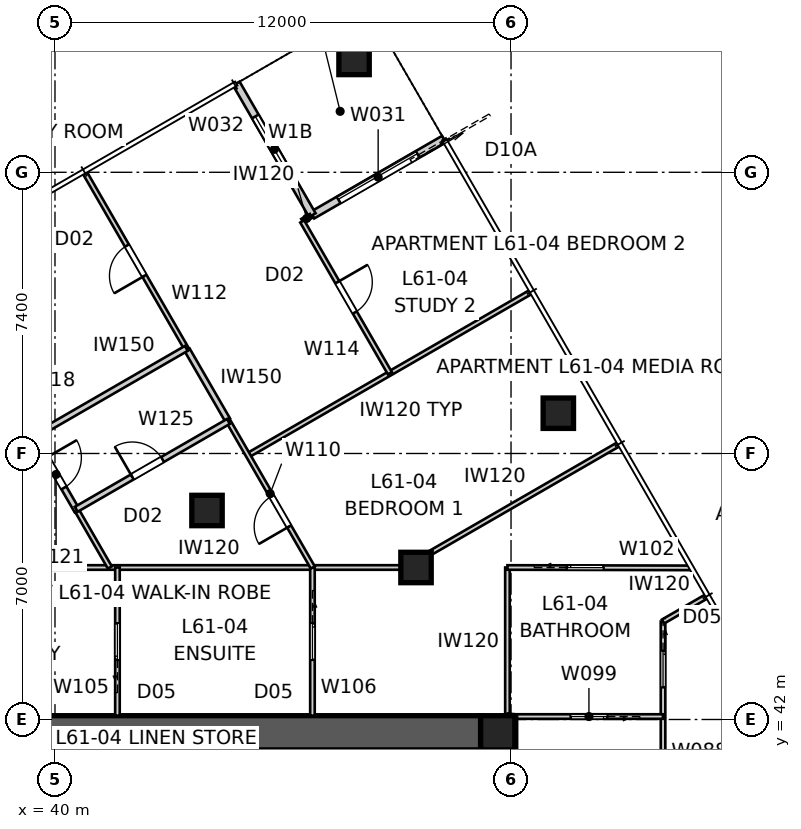
"""IFC4 building model, lengths in metres.
Left out: names, types, materials, properties, quantities, classifications, styles, units other than length and angle.
Written with IfcOpenShell. Run it as: python <this file> out.ifc"""

import sys

from ifc_helpers import new_model, si_unit, direction, frame, frame_2d, origin, origin_2d, place, context, subcontext, project, spatial, polyline, rectangle, outline, extrude, element, fill, save


model = new_model("IFC4")
c1 = context("Model", 3, precision=1e-05, world=origin(), true_north=direction((0.0, 1.0)))
c2 = subcontext(c1, "Body", "Model", "MODEL_VIEW")
j1 = project(units=[si_unit("LENGTHUNIT", "METRE"), si_unit("PLANEANGLEUNIT", "RADIAN")], contexts=[c1])
p1 = place(None, origin())
s1 = spatial("IfcSite", under=j1, at=p1, CompositionType="ELEMENT")
p2 = place(p1, origin())
s2 = spatial("IfcBuilding", under=s1, at=p2, CompositionType="ELEMENT")
p3 = place(p2, frame((0.0, 0.0, 221.8)))
s3 = spatial("IfcBuildingStorey", under=s2, at=p3, CompositionType="ELEMENT", Elevation=221.8)
p4 = place(p3, frame((28.8, 41.65, 0.0), z_axis=(0.0, 0.0, 1.0), x_axis=(1.0, 0.0, 0.0)))
e1 = element("IfcWall", 1, at=p4, inside=s3, PredefinedType="SHEAR", context=c2, shape_type="SweptSolid", body=[
    extrude(outline(polyline([(0.0, -0.45), (22.4, -0.45), (22.4, -0.025), (22.85, -0.025), (22.85, 0.025), (22.4, 0.025), (22.4, 0.45), (0.0, 0.45), (0.0, 0.025), (-0.45, 0.025), (-0.45, -0.025), (0.0, -0.025), (0.0, -0.45)])), origin(), (0.0, 0.0, 1.0), 3.4),
])
p5 = place(p3, frame((51.65, 18.8, 0.0), z_axis=(0.0, 0.0, 1.0), x_axis=(0.0, 1.0, 0.0)))
e2 = element("IfcWall", 2, at=p5, inside=s3, PredefinedType="SHEAR", context=c2, shape_type="SweptSolid", body=[
    extrude(outline(polyline([(0.0, -0.45), (22.4, -0.45), (22.4, -0.025), (22.85, -0.025), (22.85, 0.025), (22.4, 0.025), (22.4, 0.45), (0.0, 0.45), (0.0, 0.025), (-0.45, 0.025), (-0.45, -0.025), (0.0, -0.025), (0.0, -0.45)])), origin(), (0.0, 0.0, 1.0), 3.4),
])
p6 = place(p5, frame((11.14, 0.0, 0.0)))
e3 = element("IfcOpeningElement", 3, at=p6, cuts=e2, PredefinedType="OPENING", context=c2, shape_type="SweptSolid", body=[
    extrude(rectangle(XDim=1.02, YDim=2.4, at=frame_2d((0.51, 1.2))), frame((0.0, 0.46, 0.0), z_axis=(0.0, -1.0, 0.0), x_axis=(1.0, 0.0, 0.0)), (0.0, 0.0, 1.0), 0.92),
])
p7 = place(p3, frame((51.65, 41.65, 0.0), z_axis=(0.0, 0.0, 1.0), x_axis=(1.0, 0.0, 0.0)))
e4 = element("IfcColumn", 4, at=p7, inside=s3, PredefinedType="COLUMN", context=c2, shape_type="SweptSolid", body=[
    extrude(rectangle(XDim=0.9, YDim=0.9, at=origin_2d()), origin(), (0.0, 0.0, 1.0), 3.4),
])
for number, where, z_axis, x_axis in (
    (5, (53.245, 50.06, 0.0), (0.0, 0.0, 1.0), (1.0, 0.0, 0.0)),
    (6, (47.87, 59.37, 0.0), (0.0, 0.0, 1.0), (1.0, 0.0, 0.0)),
    (7, (49.5, 46.0, 0.0), (0.0, 0.0, 1.0), (1.0, 0.0, 0.0)),
    (8, (44.0, 47.5, 0.0), (0.0, 0.0, 1.0), (1.0, 0.0, 0.0)),
):
    element("IfcColumn", number, at=place(p3, frame(where, z_axis=z_axis, x_axis=x_axis)), inside=s3, PredefinedType="COLUMN", context=c2, shape_type="SweptSolid", body=[
        extrude(rectangle(XDim=0.8, YDim=0.8, at=origin_2d()), origin(), (0.0, 0.0, 1.0), 3.4),
    ])
p8 = place(p3, frame((50.236, 57.271, 0.0), z_axis=(0.0, 0.0, 1.0), x_axis=(-0.866026010844, -0.49999894854, 0.0)))
e9 = element("IfcWall", 9, at=p8, inside=s3, PredefinedType="SOLIDWALL", context=c2, shape_type="SweptSolid", body=[
    extrude(rectangle(XDim=4.0, YDim=0.2, at=frame_2d((2.0, 0.0))), origin(), (0.0, 0.0, 1.0), 3.25),
])
p9 = place(p8, frame((0.8, 0.0, 0.0)))
e10 = element("IfcOpeningElement", 10, at=p9, cuts=e9, PredefinedType="OPENING", context=c2, shape_type="SweptSolid", body=[
    extrude(rectangle(XDim=2.4, YDim=2.1, at=frame_2d((1.2, 1.05))), frame((0.0, 0.11, 0.0), z_axis=(0.0, -1.0, 0.0), x_axis=(1.0, 0.0, 0.0)), (0.0, 0.0, 1.0), 0.22),
])
p10 = place(p3, frame((46.771, 55.271, 0.0), z_axis=(0.0, 0.0, 1.0), x_axis=(-0.49999894854, 0.866026010844, 0.0)))
e11 = element("IfcWall", 11, at=p10, inside=s3, PredefinedType="SOLIDWALL", context=c2, shape_type="SweptSolid", body=[
    extrude(rectangle(XDim=4.0, YDim=0.2, at=frame_2d((2.0, 0.0))), origin(), (0.0, 0.0, 1.0), 3.25),
])
p11 = place(p10, frame((1.0, 0.0, 0.45)))
e12 = element("IfcOpeningElement", 12, at=p11, cuts=e11, PredefinedType="OPENING", context=c2, shape_type="SweptSolid", body=[
    extrude(rectangle(XDim=2.0, YDim=1.8, at=frame_2d((1.0, 0.9))), frame((0.0, 0.11, 0.0), z_axis=(0.0, -1.0, 0.0), x_axis=(1.0, 0.0, 0.0)), (0.0, 0.0, 1.0), 0.22),
])
p12 = place(p3, frame((59.486, 41.25, 0.0), z_axis=(0.0, 0.0, 1.0), x_axis=(-0.866020489494, -0.500008511703, 0.0)))
e13 = element("IfcWall", 13, at=p12, inside=s3, PredefinedType="PARTITIONING", context=c2, shape_type="SweptSolid", body=[
    extrude(rectangle(XDim=8.496, YDim=0.25, at=frame_2d((4.248, 0.0))), origin(), (0.0, 0.0, 1.0), 3.25),
])
p13 = place(p3, frame((56.0, 44.578, 0.0), z_axis=(0.0, 0.0, 1.0), x_axis=(0.0, -1.0, 0.0)))
e14 = element("IfcWall", 14, at=p13, inside=s3, PredefinedType="PARTITIONING", context=c2, shape_type="SweptSolid", body=[
    extrude(rectangle(XDim=10.681, YDim=0.12, at=frame_2d((5.34, 0.0))), origin(), (0.0, 0.0, 1.0), 2.55),
])
p14 = place(p13, frame((0.77, 0.0, 0.0)))
e15 = element("IfcOpeningElement", 15, at=p14, cuts=e14, PredefinedType="OPENING", context=c2, shape_type="SweptSolid", body=[
    extrude(rectangle(XDim=0.96, YDim=2.1, at=frame_2d((0.48, 1.05))), frame((0.0, 0.07, 0.0), z_axis=(0.0, -1.0, 0.0), x_axis=(1.0, 0.0, 0.0)), (0.0, 0.0, 1.0), 0.14),
])
p15 = place(p13, frame((7.379, 0.0, 0.0)))
e16 = element("IfcOpeningElement", 16, at=p15, cuts=e14, PredefinedType="OPENING", context=c2, shape_type="SweptSolid", body=[
    extrude(rectangle(XDim=0.96, YDim=2.1, at=frame_2d((0.48, 1.05))), frame((0.0, 0.07, 0.0), z_axis=(0.0, -1.0, 0.0), x_axis=(1.0, 0.0, 0.0)), (0.0, 0.0, 1.0), 0.14),
])
p16 = place(p3, frame((32.0, 46.0, 0.0), z_axis=(0.0, 0.0, 1.0), x_axis=(1.0, 0.0, 0.0)))
e17 = element("IfcWall", 17, at=p16, inside=s3, PredefinedType="PARTITIONING", context=c2, shape_type="SweptSolid", body=[
    extrude(rectangle(XDim=17.213, YDim=0.12, at=frame_2d((8.607, 0.0))), origin(), (0.0, 0.0, 1.0), 3.25),
])
p17 = place(p3, frame((56.0, 42.078, 0.0), z_axis=(0.0, 0.0, 1.0), x_axis=(-1.0, 0.0, 0.0)))
e18 = element("IfcWall", 18, at=p17, inside=s3, PredefinedType="PARTITIONING", context=c2, shape_type="SweptSolid", body=[
    extrude(rectangle(XDim=3.9, YDim=0.12, at=frame_2d((1.95, 0.0))), origin(), (0.0, 0.0, 1.0), 3.25),
])
p18 = place(p17, frame((1.47, 0.0, 0.0)))
e19 = element("IfcOpeningElement", 19, at=p18, cuts=e18, PredefinedType="OPENING", context=c2, shape_type="SweptSolid", body=[
    extrude(rectangle(XDim=0.96, YDim=2.1, at=frame_2d((0.48, 1.05))), frame((0.0, 0.07, 0.0), z_axis=(0.0, -1.0, 0.0), x_axis=(1.0, 0.0, 0.0)), (0.0, 0.0, 1.0), 0.14),
])
p19 = place(p3, frame((51.906, 42.1, 0.0), z_axis=(0.0, 0.0, 1.0), x_axis=(0.0, 1.0, 0.0)))
e20 = element("IfcWall", 20, at=p19, inside=s3, PredefinedType="PARTITIONING", context=c2, shape_type="SweptSolid", body=[
    extrude(rectangle(XDim=3.9, YDim=0.12, at=frame_2d((1.95, 0.0))), origin(), (0.0, 0.0, 1.0), 3.25),
])
p20 = place(p3, frame((51.906, 46.0, 0.0), z_axis=(0.0, 0.0, 1.0), x_axis=(0.999997822794, -0.002086721841, 0.0)))
e21 = element("IfcWall", 21, at=p20, inside=s3, PredefinedType="PARTITIONING", context=c2, shape_type="SweptSolid", body=[
    extrude(rectangle(XDim=4.797, YDim=0.12, at=frame_2d((2.398, 0.0))), origin(), (0.0, 0.0, 1.0), 3.25),
])
p21 = place(p20, frame((1.567, 0.0, 0.0)))
e22 = element("IfcOpeningElement", 22, at=p21, cuts=e21, PredefinedType="OPENING", context=c2, shape_type="SweptSolid", body=[
    extrude(rectangle(XDim=0.96, YDim=2.1, at=frame_2d((0.48, 1.05))), frame((0.0, 0.07, 0.0), z_axis=(0.0, -1.0, 0.0), x_axis=(1.0, 0.0, 0.0)), (0.0, 0.0, 1.0), 0.14),
])
p22 = place(p3, frame((57.138, 45.235, 0.0), z_axis=(0.0, 0.0, 1.0), x_axis=(-0.866040225545, -0.499974327079, 0.0)))
e23 = element("IfcWall", 23, at=p22, inside=s3, PredefinedType="PARTITIONING", context=c2, shape_type="SweptSolid", body=[
    extrude(rectangle(XDim=1.314, YDim=0.12, at=frame_2d((0.657, 0.0))), origin(), (0.0, 0.0, 1.0), 3.25),
])
p23 = place(p3, frame((52.1, 41.18, 0.0), z_axis=(0.0, 0.0, 1.0), x_axis=(0.0, 1.0, 0.0)))
e24 = element("IfcWall", 24, at=p23, inside=s3, PredefinedType="PARTITIONING", context=c2, shape_type="SweptSolid", body=[
    extrude(rectangle(XDim=0.898, YDim=0.12, at=frame_2d((0.449, 0.0))), origin(), (0.0, 0.0, 1.0), 3.25),
])
p24 = place(p3, frame((41.644, 42.1, 0.0), z_axis=(0.0, 0.0, 1.0), x_axis=(0.0, 1.0, 0.0)))
e25 = element("IfcWall", 25, at=p24, inside=s3, PredefinedType="PARTITIONING", context=c2, shape_type="SweptSolid", body=[
    extrude(rectangle(XDim=3.9, YDim=0.12, at=frame_2d((1.95, 0.0))), origin(), (0.0, 0.0, 1.0), 3.25),
])
p25 = place(p24, frame((1.47, 0.0, 0.0)))
e26 = element("IfcOpeningElement", 26, at=p25, cuts=e25, PredefinedType="OPENING", context=c2, shape_type="SweptSolid", body=[
    extrude(rectangle(XDim=0.96, YDim=2.1, at=frame_2d((0.48, 1.05))), frame((0.0, 0.07, 0.0), z_axis=(0.0, -1.0, 0.0), x_axis=(1.0, 0.0, 0.0)), (0.0, 0.0, 1.0), 0.14),
])
p26 = place(p3, frame((46.775, 46.0, 0.0), z_axis=(0.0, 0.0, 1.0), x_axis=(0.0, -1.0, 0.0)))
e27 = element("IfcWall", 27, at=p26, inside=s3, PredefinedType="PARTITIONING", context=c2, shape_type="SweptSolid", body=[
    extrude(rectangle(XDim=3.9, YDim=0.12, at=frame_2d((1.95, 0.0))), origin(), (0.0, 0.0, 1.0), 3.25),
])
p27 = place(p26, frame((1.47, 0.0, 0.0)))
e28 = element("IfcOpeningElement", 28, at=p27, cuts=e27, PredefinedType="OPENING", context=c2, shape_type="SweptSolid", body=[
    extrude(rectangle(XDim=0.96, YDim=2.1, at=frame_2d((0.48, 1.05))), frame((0.0, 0.07, 0.0), z_axis=(0.0, -1.0, 0.0), x_axis=(1.0, 0.0, 0.0)), (0.0, 0.0, 1.0), 0.14),
])
p28 = place(p3, frame((45.079, 48.954, 0.0), z_axis=(0.0, 0.0, 1.0), x_axis=(0.866025991751, 0.49999898161, 0.0)))
e29 = element("IfcWall", 29, at=p28, inside=s3, PredefinedType="PARTITIONING", context=c2, shape_type="SweptSolid", body=[
    extrude(rectangle(XDim=8.585, YDim=0.12, at=frame_2d((4.292, 0.0))), origin(), (0.0, 0.0, 1.0), 3.25),
])
p29 = place(p3, frame((46.784, 46.0, 0.0), z_axis=(0.0, 0.0, 1.0), x_axis=(-0.500017500808, 0.866015299452, 0.0)))
e30 = element("IfcWall", 30, at=p29, inside=s3, PredefinedType="PARTITIONING", context=c2, shape_type="SweptSolid", body=[
    extrude(rectangle(XDim=4.489, YDim=0.12, at=frame_2d((2.244, 0.0))), origin(), (0.0, 0.0, 1.0), 3.25),
])
p30 = place(p29, frame((1.245, 0.0, 0.0)))
e31 = element("IfcOpeningElement", 31, at=p30, cuts=e30, PredefinedType="OPENING", context=c2, shape_type="SweptSolid", body=[
    extrude(rectangle(XDim=0.92, YDim=2.34, at=frame_2d((0.46, 1.17))), frame((0.0, 0.07, 0.0), z_axis=(0.0, -1.0, 0.0), x_axis=(1.0, 0.0, 0.0)), (0.0, 0.0, 1.0), 0.14),
])
p31 = place(p3, frame((54.826, 49.241, 0.0), z_axis=(0.0, 0.0, 1.0), x_axis=(-0.866023120914, -0.500003954026, 0.0)))
e32 = element("IfcWall", 32, at=p31, inside=s3, PredefinedType="PARTITIONING", context=c2, shape_type="SweptSolid", body=[
    extrude(rectangle(XDim=6.481, YDim=0.12, at=frame_2d((3.241, 0.0))), origin(), (0.0, 0.0, 1.0), 3.25),
])
p32 = place(p3, frame((43.48, 51.722, 0.0), z_axis=(0.0, 0.0, 1.0), x_axis=(-0.499989180974, 0.866031650062, 0.0)))
e33 = element("IfcWall", 33, at=p32, inside=s3, PredefinedType="PARTITIONING", context=c2, shape_type="SweptSolid", body=[
    extrude(rectangle(XDim=5.388, YDim=0.12, at=frame_2d((2.694, 0.0))), origin(), (0.0, 0.0, 1.0), 3.25),
])
p33 = place(p32, frame((2.254, 0.0, 0.0)))
e34 = element("IfcOpeningElement", 34, at=p33, cuts=e33, PredefinedType="OPENING", context=c2, shape_type="SweptSolid", body=[
    extrude(rectangle(XDim=0.92, YDim=2.34, at=frame_2d((0.46, 1.17))), frame((0.0, 0.07, 0.0), z_axis=(0.0, -1.0, 0.0), x_axis=(1.0, 0.0, 0.0)), (0.0, 0.0, 1.0), 0.14),
])
p34 = place(p3, frame((46.737, 55.251, 0.0), z_axis=(0.0, 0.0, 1.0), x_axis=(-0.865829262097, -0.500339573586, 0.0)))
e35 = element("IfcWall", 35, at=p34, inside=s3, PredefinedType="PARTITIONING", context=c2, shape_type="SweptSolid", body=[
    extrude(rectangle(XDim=0.262, YDim=0.12, at=frame_2d((0.131, 0.0))), origin(), (0.0, 0.0, 1.0), 3.25),
])
p35 = place(p3, frame((46.506, 55.107, 0.0), z_axis=(0.0, 0.0, 1.0), x_axis=(0.49996820914, -0.866043757468, 0.0)))
e36 = element("IfcWall", 36, at=p35, inside=s3, PredefinedType="PARTITIONING", context=c2, shape_type="SweptSolid", body=[
    extrude(rectangle(XDim=4.615, YDim=0.12, at=frame_2d((2.308, 0.0))), origin(), (0.0, 0.0, 1.0), 3.25),
])
p36 = place(p35, frame((1.847, 0.0, 0.0)))
e37 = element("IfcOpeningElement", 37, at=p36, cuts=e36, PredefinedType="OPENING", context=c2, shape_type="SweptSolid", body=[
    extrude(rectangle(XDim=0.92, YDim=2.34, at=frame_2d((0.46, 1.17))), frame((0.0, 0.07, 0.0), z_axis=(0.0, -1.0, 0.0), x_axis=(1.0, 0.0, 0.0)), (0.0, 0.0, 1.0), 0.14),
])
p37 = place(p3, frame((44.54, 49.887, 0.0), z_axis=(0.0, 0.0, 1.0), x_axis=(-0.500005013853, 0.866022509016, 0.0)))
e38 = element("IfcWall", 38, at=p37, inside=s3, PredefinedType="SOLIDWALL", context=c2, shape_type="SweptSolid", body=[
    extrude(rectangle(XDim=2.119, YDim=0.15, at=frame_2d((1.06, 0.0))), origin(), (0.0, 0.0, 1.0), 3.25),
])
p38 = place(p3, frame((40.584, 47.488, 0.0), z_axis=(0.0, 0.0, 1.0), x_axis=(0.500005339912, -0.866022320763, 0.0)))
e39 = element("IfcWall", 39, at=p38, inside=s3, PredefinedType="PARTITIONING", context=c2, shape_type="SweptSolid", body=[
    extrude(rectangle(XDim=1.718, YDim=0.12, at=frame_2d((0.859, 0.0))), origin(), (0.0, 0.0, 1.0), 3.25),
])
p39 = place(p3, frame((39.475, 49.41, 0.0), z_axis=(0.0, 0.0, 1.0), x_axis=(0.500008142102, -0.866020702889, 0.0)))
e40 = element("IfcWall", 40, at=p39, inside=s3, PredefinedType="SOLIDWALL", context=c2, shape_type="SweptSolid", body=[
    extrude(rectangle(XDim=2.219, YDim=0.15, at=frame_2d((1.11, 0.0))), origin(), (0.0, 0.0, 1.0), 3.25),
])
p40 = place(p39, frame((0.6, 0.0, 0.0)))
e41 = element("IfcOpeningElement", 41, at=p40, cuts=e40, PredefinedType="OPENING", context=c2, shape_type="SweptSolid", body=[
    extrude(rectangle(XDim=0.92, YDim=2.34, at=frame_2d((0.46, 1.17))), frame((0.0, 0.085, 0.0), z_axis=(0.0, -1.0, 0.0), x_axis=(1.0, 0.0, 0.0)), (0.0, 0.0, 1.0), 0.17),
])
p41 = place(p3, frame((43.455, 51.766, 0.0), z_axis=(0.0, 0.0, 1.0), x_axis=(-0.866025598446, -0.499999662836, 0.0)))
e42 = element("IfcWall", 42, at=p41, inside=s3, PredefinedType="SOLIDWALL", context=c2, shape_type="SweptSolid", body=[
    extrude(rectangle(XDim=4.625, YDim=0.15, at=frame_2d((2.312, 0.0))), origin(), (0.0, 0.0, 1.0), 3.25),
])
p42 = place(p3, frame((40.559, 47.531, 0.0), z_axis=(0.0, 0.0, 1.0), x_axis=(0.866025598446, 0.499999662836, 0.0)))
e43 = element("IfcWall", 43, at=p42, inside=s3, PredefinedType="SOLIDWALL", context=c2, shape_type="SweptSolid", body=[
    extrude(rectangle(XDim=4.625, YDim=0.15, at=frame_2d((2.312, 0.0))), origin(), (0.0, 0.0, 1.0), 3.25),
])
p43 = place(p42, frame((1.702, 0.0, 0.0)))
e44 = element("IfcOpeningElement", 44, at=p43, cuts=e43, PredefinedType="OPENING", context=c2, shape_type="SweptSolid", body=[
    extrude(rectangle(XDim=0.92, YDim=2.34, at=frame_2d((0.46, 1.17))), frame((0.0, 0.085, 0.0), z_axis=(0.0, -1.0, 0.0), x_axis=(1.0, 0.0, 0.0)), (0.0, 0.0, 1.0), 0.17),
])
p44 = place(p3, frame((51.906, 42.1, 0.0), z_axis=(0.0, 0.0, 1.0), x_axis=(0.993387055489, -0.114813579278, 0.0)))
e45 = element("IfcWall", 45, at=p44, inside=s3, PredefinedType="PARTITIONING", context=c2, shape_type="SweptSolid", body=[
    extrude(rectangle(XDim=0.196, YDim=0.12, at=frame_2d((0.098, 0.0))), origin(), (0.0, 0.0, 1.0), 3.25),
])
p45 = place(p9, origin())
e46 = element("IfcDoor", 46, at=p45, inside=s3, OperationType="SLIDING_TO_LEFT", PredefinedType="DOOR", context=c2, shape_type="SweptSolid", body=[
    extrude(rectangle(XDim=2.4, YDim=2.1, at=frame_2d((1.2, 1.05))), frame((0.0, 0.025, 0.0), z_axis=(0.0, -1.0, 0.0), x_axis=(1.0, 0.0, 0.0)), (0.0, 0.0, 1.0), 0.05),
])
fill(e10, e46)
p46 = place(p11, origin())
e47 = element("IfcWindow", 47, at=p46, inside=s3, PartitioningType="SINGLE_PANEL", PredefinedType="WINDOW", context=c2, shape_type="SweptSolid", body=[
    extrude(rectangle(XDim=2.0, YDim=1.8, at=frame_2d((1.0, 0.9))), frame((0.0, 0.03, 0.0), z_axis=(0.0, -1.0, 0.0), x_axis=(1.0, 0.0, 0.0)), (0.0, 0.0, 1.0), 0.06),
])
fill(e12, e47)
p47 = place(p40, origin())
e48 = element("IfcDoor", 48, at=p47, inside=s3, OperationType="SINGLE_SWING_LEFT", PredefinedType="DOOR", context=c2, shape_type="SweptSolid", body=[
    extrude(rectangle(XDim=0.92, YDim=2.34, at=frame_2d((0.46, 1.17))), frame((0.0, 0.025, 0.0), z_axis=(0.0, -1.0, 0.0), x_axis=(1.0, 0.0, 0.0)), (0.0, 0.0, 1.0), 0.05),
])
fill(e41, e48)
p48 = place(p25, origin())
e49 = element("IfcDoor", 49, at=p48, inside=s3, OperationType="SLIDING_TO_LEFT", PredefinedType="DOOR", context=c2, shape_type="SweptSolid", body=[
    extrude(rectangle(XDim=0.96, YDim=2.1, at=frame_2d((0.48, 1.05))), frame((0.0, 0.025, 0.0), z_axis=(0.0, -1.0, 0.0), x_axis=(1.0, 0.0, 0.0)), (0.0, 0.0, 1.0), 0.05),
])
fill(e26, e49)
p49 = place(p33, origin())
e50 = element("IfcDoor", 50, at=p49, inside=s3, OperationType="SINGLE_SWING_LEFT", PredefinedType="DOOR", context=c2, shape_type="SweptSolid", body=[
    extrude(rectangle(XDim=0.92, YDim=2.34, at=frame_2d((0.46, 1.17))), frame((0.0, 0.025, 0.0), z_axis=(0.0, -1.0, 0.0), x_axis=(1.0, 0.0, 0.0)), (0.0, 0.0, 1.0), 0.05),
])
fill(e34, e50)
p50 = place(p43, origin())
e51 = element("IfcDoor", 51, at=p50, inside=s3, OperationType="SINGLE_SWING_LEFT", PredefinedType="DOOR", context=c2, shape_type="SweptSolid", body=[
    extrude(rectangle(XDim=0.92, YDim=2.34, at=frame_2d((0.46, 1.17))), frame((0.0, 0.025, 0.0), z_axis=(0.0, -1.0, 0.0), x_axis=(1.0, 0.0, 0.0)), (0.0, 0.0, 1.0), 0.05),
])
fill(e44, e51)
p51 = place(p27, origin())
e52 = element("IfcDoor", 52, at=p51, inside=s3, OperationType="SLIDING_TO_LEFT", PredefinedType="DOOR", context=c2, shape_type="SweptSolid", body=[
    extrude(rectangle(XDim=0.96, YDim=2.1, at=frame_2d((0.48, 1.05))), frame((0.0, 0.025, 0.0), z_axis=(0.0, -1.0, 0.0), x_axis=(1.0, 0.0, 0.0)), (0.0, 0.0, 1.0), 0.05),
])
fill(e28, e52)
p52 = place(p30, origin())
e53 = element("IfcDoor", 53, at=p52, inside=s3, OperationType="SINGLE_SWING_LEFT", PredefinedType="DOOR", context=c2, shape_type="SweptSolid", body=[
    extrude(rectangle(XDim=0.92, YDim=2.34, at=frame_2d((0.46, 1.17))), frame((0.0, 0.025, 0.0), z_axis=(0.0, -1.0, 0.0), x_axis=(1.0, 0.0, 0.0)), (0.0, 0.0, 1.0), 0.05),
])
fill(e31, e53)
p53 = place(p21, origin())
e54 = element("IfcDoor", 54, at=p53, inside=s3, OperationType="SLIDING_TO_LEFT", PredefinedType="DOOR", context=c2, shape_type="SweptSolid", body=[
    extrude(rectangle(XDim=0.96, YDim=2.1, at=frame_2d((0.48, 1.05))), frame((0.0, 0.025, 0.0), z_axis=(0.0, -1.0, 0.0), x_axis=(1.0, 0.0, 0.0)), (0.0, 0.0, 1.0), 0.05),
])
fill(e22, e54)
p54 = place(p18, origin())
e55 = element("IfcDoor", 55, at=p54, inside=s3, OperationType="SLIDING_TO_LEFT", PredefinedType="DOOR", context=c2, shape_type="SweptSolid", body=[
    extrude(rectangle(XDim=0.96, YDim=2.1, at=frame_2d((0.48, 1.05))), frame((0.0, 0.025, 0.0), z_axis=(0.0, -1.0, 0.0), x_axis=(1.0, 0.0, 0.0)), (0.0, 0.0, 1.0), 0.05),
])
fill(e19, e55)
p55 = place(p14, origin())
e56 = element("IfcDoor", 56, at=p55, inside=s3, OperationType="SLIDING_TO_LEFT", PredefinedType="DOOR", context=c2, shape_type="SweptSolid", body=[
    extrude(rectangle(XDim=0.96, YDim=2.1, at=frame_2d((0.48, 1.05))), frame((0.0, 0.025, 0.0), z_axis=(0.0, -1.0, 0.0), x_axis=(1.0, 0.0, 0.0)), (0.0, 0.0, 1.0), 0.05),
])
fill(e15, e56)
p56 = place(p36, origin())
e57 = element("IfcDoor", 57, at=p56, inside=s3, OperationType="SINGLE_SWING_LEFT", PredefinedType="DOOR", context=c2, shape_type="SweptSolid", body=[
    extrude(rectangle(XDim=0.92, YDim=2.34, at=frame_2d((0.46, 1.17))), frame((0.0, 0.025, 0.0), z_axis=(0.0, -1.0, 0.0), x_axis=(1.0, 0.0, 0.0)), (0.0, 0.0, 1.0), 0.05),
])
fill(e37, e57)
save(model, sys.argv[1])
